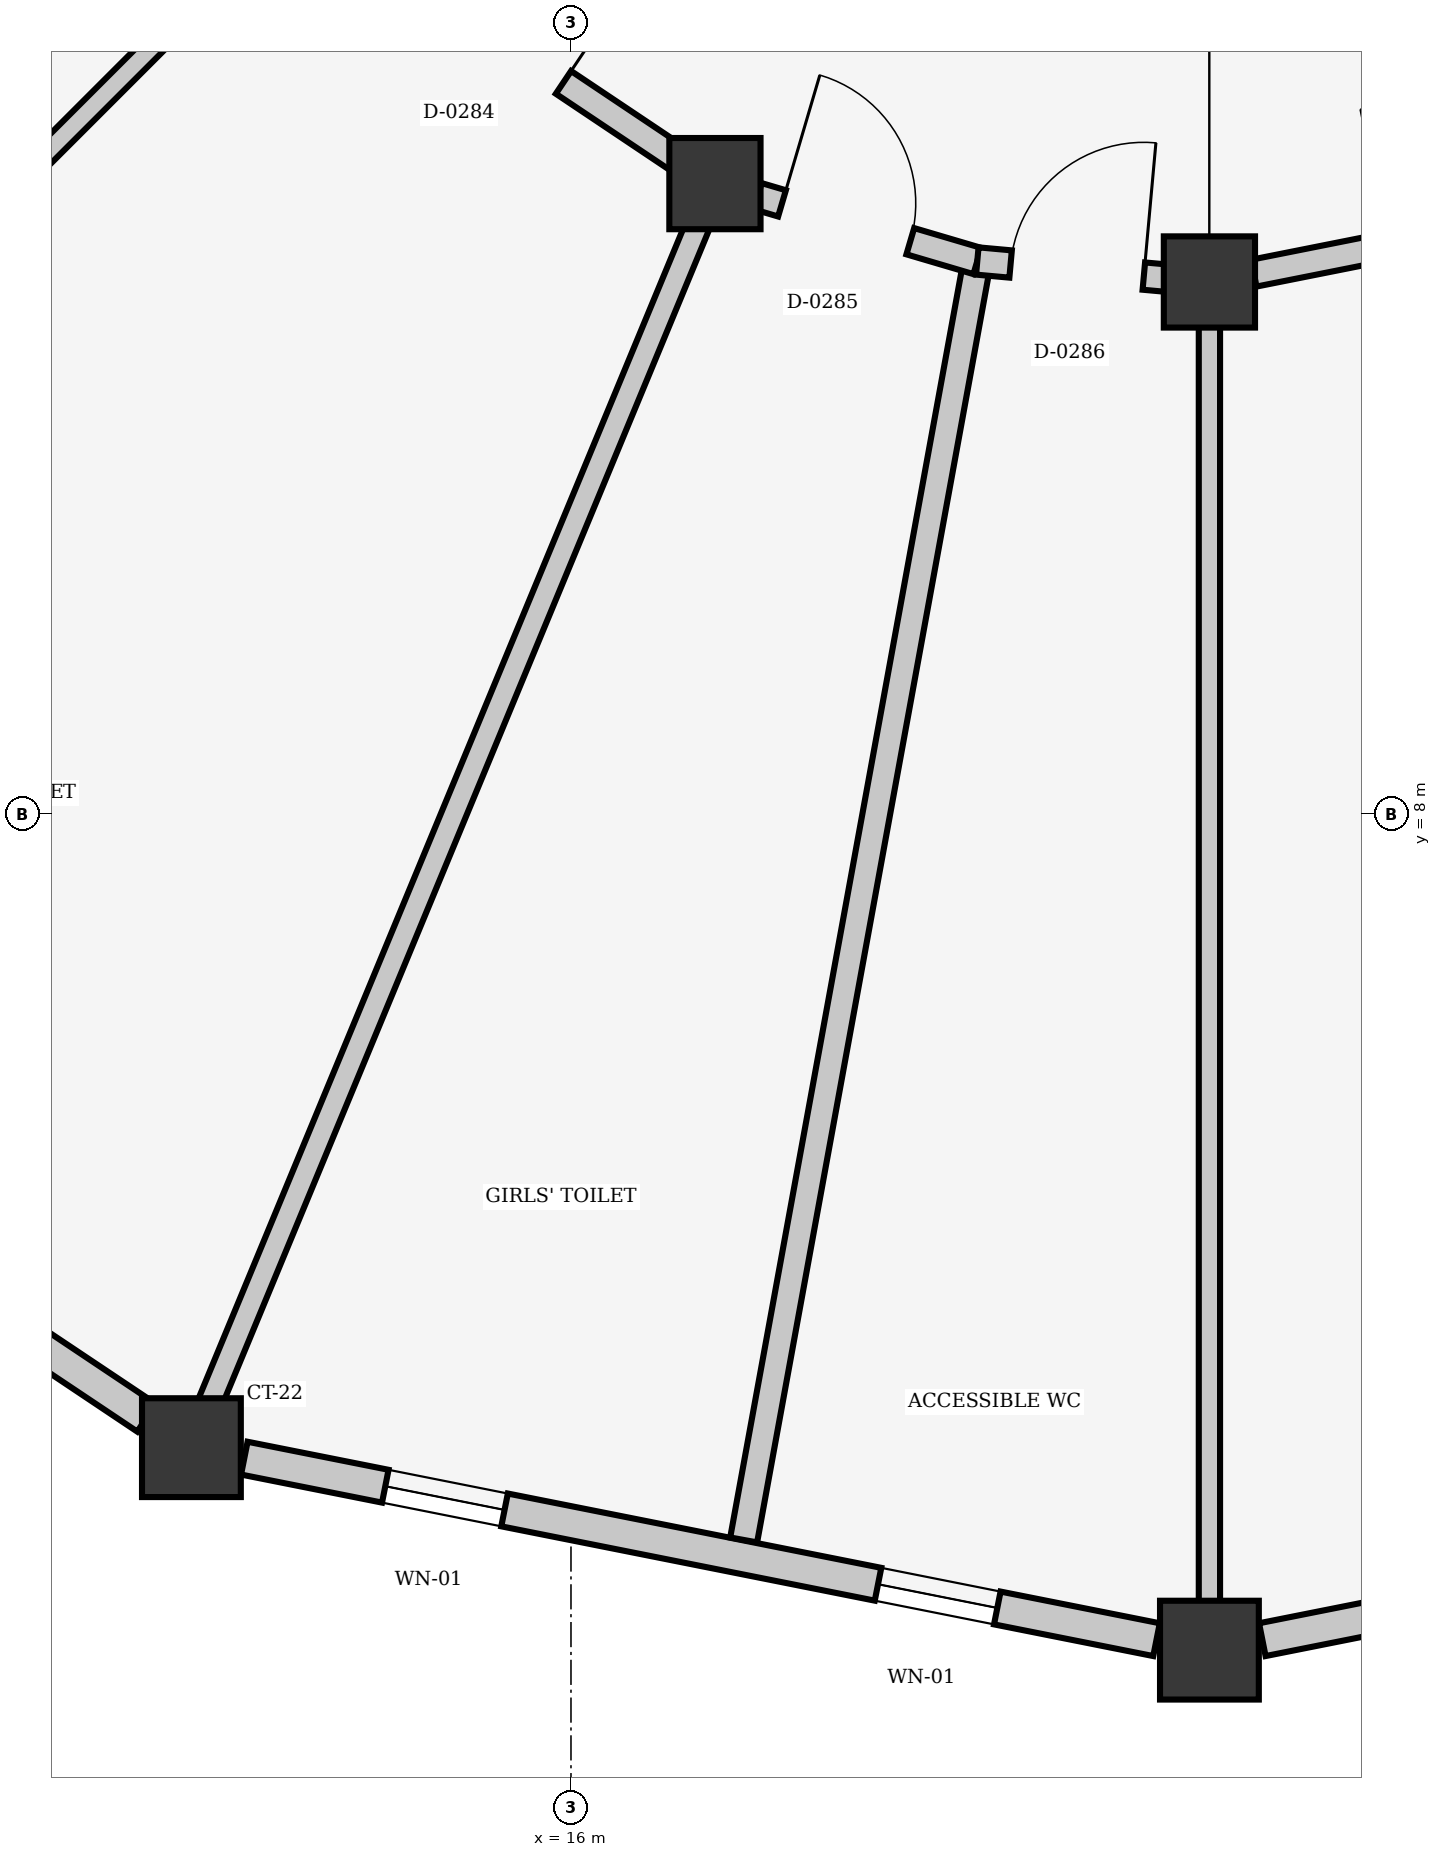
"""IFC4 building model, lengths in metres.
Left out: names, types, materials, properties, quantities, classifications, styles, units other than length and angle.
Written with IfcOpenShell. Run it as: python <this file> out.ifc"""

import sys

from ifc_helpers import new_model, si_unit, direction, frame, frame_2d, origin, origin_2d, place, context, subcontext, project, spatial, rectangle, extrude, element, fill, save


model = new_model("IFC4")
c1 = context("Model", 3, precision=1e-05, world=origin(), true_north=direction((0.0, 1.0)))
c2 = subcontext(c1, "Body", "Model", "MODEL_VIEW")
j1 = project(units=[si_unit("LENGTHUNIT", "METRE"), si_unit("PLANEANGLEUNIT", "RADIAN")], contexts=[c1])
p1 = place(None, origin())
s1 = spatial("IfcSite", under=j1, at=p1, CompositionType="ELEMENT")
p2 = place(p1, origin())
s2 = spatial("IfcBuilding", under=s1, at=p2, CompositionType="ELEMENT")
p3 = place(p2, origin())
s3 = spatial("IfcBuildingStorey", under=s2, at=p3, CompositionType="ELEMENT", Elevation=0.0)
for number, where, z_axis, x_axis in (
    (1, (16.947, 12.147, 0.0), (0.0, 0.0, 1.0), (-0.383, -0.924, 0.0)),
    (2, (20.2, 11.5, 0.0), (0.0, 0.0, 1.0), (0.0, -1.0, 0.0)),
):
    element("IfcColumn", number, at=place(p3, frame(where, z_axis=z_axis, x_axis=x_axis)), inside=s3, PredefinedType="COLUMN", context=c2, shape_type="SweptSolid", body=[
        extrude(rectangle(XDim=0.6, YDim=0.6, at=origin_2d()), origin(), (0.0, 0.0, 1.0), 4.5),
    ])
for number, where, z_axis, x_axis in (
    (3, (13.503, 3.832, 0.0), (0.0, 0.0, 1.0), (-0.383, -0.924, 0.0)),
    (4, (20.2, 2.5, 0.0), (0.0, 0.0, 1.0), (0.0, -1.0, 0.0)),
):
    element("IfcColumn", number, at=place(p3, frame(where, z_axis=z_axis, x_axis=x_axis)), inside=s3, PredefinedType="COLUMN", context=c2, shape_type="SweptSolid", body=[
        extrude(rectangle(XDim=0.65, YDim=0.65, at=origin_2d()), origin(), (0.0, 0.0, 1.0), 4.5),
    ])
p4 = place(p3, frame((13.208, 4.029, 0.0), z_axis=(0.0, 0.0, 1.0), x_axis=(-0.83139901156, 0.555675879967, 0.0)))
e5 = element("IfcWall", 5, at=p4, inside=s3, PredefinedType="SOLIDWALL", context=c2, shape_type="SweptSolid", body=[
    extrude(rectangle(XDim=6.118, YDim=0.22, at=frame_2d((3.059, 0.0))), origin(), (0.0, 0.0, 1.0), 3.55),
])
p5 = place(p4, frame((0.896, 0.0, 0.85)))
e6 = element("IfcOpeningElement", 6, at=p5, cuts=e5, PredefinedType="OPENING", context=c2, shape_type="SweptSolid", body=[
    extrude(rectangle(XDim=0.9, YDim=1.4, at=frame_2d((0.45, 0.7))), frame((0.0, 0.12, 0.0), z_axis=(0.0, -1.0, 0.0), x_axis=(1.0, 0.0, 0.0)), (0.0, 0.0, 1.0), 0.24),
])
p6 = place(p4, frame((2.609, 0.0, 0.85)))
e7 = element("IfcOpeningElement", 7, at=p6, cuts=e5, PredefinedType="OPENING", context=c2, shape_type="SweptSolid", body=[
    extrude(rectangle(XDim=0.9, YDim=1.4, at=frame_2d((0.45, 0.7))), frame((0.0, 0.12, 0.0), z_axis=(0.0, -1.0, 0.0), x_axis=(1.0, 0.0, 0.0)), (0.0, 0.0, 1.0), 0.24),
])
p7 = place(p4, frame((4.323, 0.0, 0.85)))
e8 = element("IfcOpeningElement", 8, at=p7, cuts=e5, PredefinedType="OPENING", context=c2, shape_type="SweptSolid", body=[
    extrude(rectangle(XDim=0.9, YDim=1.4, at=frame_2d((0.45, 0.7))), frame((0.0, 0.12, 0.0), z_axis=(0.0, -1.0, 0.0), x_axis=(1.0, 0.0, 0.0)), (0.0, 0.0, 1.0), 0.24),
])
p8 = place(p3, frame((19.852, 2.569, 0.0), z_axis=(0.0, 0.0, 1.0), x_axis=(-0.98077967596, 0.19511849534, 0.0)))
e9 = element("IfcWall", 9, at=p8, inside=s3, PredefinedType="SOLIDWALL", context=c2, shape_type="SweptSolid", body=[
    extrude(rectangle(XDim=6.119, YDim=0.22, at=frame_2d((3.059, 0.0))), origin(), (0.0, 0.0, 1.0), 3.55),
])
p9 = place(p8, frame((1.068, 0.0, 1.15)))
e10 = element("IfcOpeningElement", 10, at=p9, cuts=e9, PredefinedType="OPENING", context=c2, shape_type="SweptSolid", body=[
    extrude(rectangle(XDim=0.8, YDim=1.1, at=frame_2d((0.4, 0.55))), frame((0.0, 0.12, 0.0), z_axis=(0.0, -1.0, 0.0), x_axis=(1.0, 0.0, 0.0)), (0.0, 0.0, 1.0), 0.24),
])
p10 = place(p8, frame((4.373, 0.0, 1.15)))
e11 = element("IfcOpeningElement", 11, at=p10, cuts=e9, PredefinedType="OPENING", context=c2, shape_type="SweptSolid", body=[
    extrude(rectangle(XDim=0.8, YDim=1.1, at=frame_2d((0.4, 0.55))), frame((0.0, 0.12, 0.0), z_axis=(0.0, -1.0, 0.0), x_axis=(1.0, 0.0, 0.0)), (0.0, 0.0, 1.0), 0.24),
])
p11 = place(p3, frame((26.549, 3.763, 0.0), z_axis=(0.0, 0.0, 1.0), x_axis=(-0.98077967596, -0.19511849534, 0.0)))
e12 = element("IfcWall", 12, at=p11, inside=s3, PredefinedType="SOLIDWALL", context=c2, shape_type="SweptSolid", body=[
    extrude(rectangle(XDim=6.119, YDim=0.22, at=frame_2d((3.059, 0.0))), origin(), (0.0, 0.0, 1.0), 3.55),
])
p12 = place(p11, frame((0.896, 0.0, 0.85)))
e13 = element("IfcOpeningElement", 13, at=p12, cuts=e12, PredefinedType="OPENING", context=c2, shape_type="SweptSolid", body=[
    extrude(rectangle(XDim=0.9, YDim=1.4, at=frame_2d((0.45, 0.7))), frame((0.0, 0.12, 0.0), z_axis=(0.0, -1.0, 0.0), x_axis=(1.0, 0.0, 0.0)), (0.0, 0.0, 1.0), 0.24),
])
p13 = place(p11, frame((2.609, 0.0, 0.85)))
e14 = element("IfcOpeningElement", 14, at=p13, cuts=e12, PredefinedType="OPENING", context=c2, shape_type="SweptSolid", body=[
    extrude(rectangle(XDim=0.9, YDim=1.4, at=frame_2d((0.45, 0.7))), frame((0.0, 0.12, 0.0), z_axis=(0.0, -1.0, 0.0), x_axis=(1.0, 0.0, 0.0)), (0.0, 0.0, 1.0), 0.24),
])
p14 = place(p11, frame((4.323, 0.0, 0.85)))
e15 = element("IfcOpeningElement", 15, at=p14, cuts=e12, PredefinedType="OPENING", context=c2, shape_type="SweptSolid", body=[
    extrude(rectangle(XDim=0.9, YDim=1.4, at=frame_2d((0.45, 0.7))), frame((0.0, 0.12, 0.0), z_axis=(0.0, -1.0, 0.0), x_axis=(1.0, 0.0, 0.0)), (0.0, 0.0, 1.0), 0.24),
])
p15 = place(p3, frame((13.984, 13.784, 0.0), z_axis=(0.0, 0.0, 1.0), x_axis=(-0.707106781187, -0.707106781187, 0.0)))
e16 = element("IfcWall", 16, at=p15, inside=s3, PredefinedType="PARTITIONING", context=c2, shape_type="SweptSolid", body=[
    extrude(rectangle(XDim=8.392, YDim=0.14, at=frame_2d((4.196, 0.0))), origin(), (0.0, 0.0, 1.0), 3.552),
])
p16 = place(p3, frame((16.836, 11.877, 0.0), z_axis=(0.0, 0.0, 1.0), x_axis=(-0.382780060664, -0.923839501839, 0.0)))
e17 = element("IfcWall", 17, at=p16, inside=s3, PredefinedType="PARTITIONING", context=c2, shape_type="SweptSolid", body=[
    extrude(rectangle(XDim=8.391, YDim=0.16, at=frame_2d((4.196, 0.0))), origin(), (0.0, 0.0, 1.0), 3.552),
])
p17 = place(p3, frame((20.2, 11.208, 0.0), z_axis=(0.0, 0.0, 1.0), x_axis=(0.0, -1.0, 0.0)))
e18 = element("IfcWall", 18, at=p17, inside=s3, PredefinedType="PARTITIONING", context=c2, shape_type="SweptSolid", body=[
    extrude(rectangle(XDim=8.391, YDim=0.14, at=frame_2d((4.196, 0.0))), origin(), (0.0, 0.0, 1.0), 3.552),
])
p18 = place(p3, frame((18.673, 11.638, 0.0), z_axis=(0.0, 0.0, 1.0), x_axis=(-0.179734485707, -0.983715159306, 0.0)))
e19 = element("IfcWall", 19, at=p18, inside=s3, PredefinedType="PARTITIONING", context=c2, shape_type="SweptSolid", body=[
    extrude(rectangle(XDim=8.552, YDim=0.18, at=frame_2d((4.276, 0.0))), origin(), (0.0, 0.0, 1.0), 3.552),
])
p19 = place(p3, frame((14.438, 13.825, 0.0), z_axis=(0.0, 0.0, 1.0), x_axis=(0.831096426298, -0.556128339679, 0.0)))
e20 = element("IfcWall", 20, at=p19, inside=s3, PredefinedType="PARTITIONING", context=c2, shape_type="SweptSolid", body=[
    extrude(rectangle(XDim=2.72, YDim=0.18, at=frame_2d((1.36, 0.0))), origin(), (0.0, 0.0, 1.0), 3.552),
])
p20 = place(p19, frame((0.9, 0.0, 0.0)))
e21 = element("IfcOpeningElement", 21, at=p20, cuts=e20, PredefinedType="OPENING", context=c2, shape_type="SweptSolid", body=[
    extrude(rectangle(XDim=0.92, YDim=2.1, at=frame_2d((0.46, 1.05))), frame((0.0, 0.1, 0.0), z_axis=(0.0, -1.0, 0.0), x_axis=(1.0, 0.0, 0.0)), (0.0, 0.0, 1.0), 0.2),
])
p21 = place(p3, frame((17.229, 12.064, 0.0), z_axis=(0.0, 0.0, 1.0), x_axis=(0.959132791877, -0.282956335051, 0.0)))
e22 = element("IfcWall", 22, at=p21, inside=s3, PredefinedType="PARTITIONING", context=c2, shape_type="SweptSolid", body=[
    extrude(rectangle(XDim=1.506, YDim=0.18, at=frame_2d((0.753, 0.0))), origin(), (0.0, 0.0, 1.0), 3.552),
])
p22 = place(p21, frame((0.166, 0.0, 0.0)))
e23 = element("IfcOpeningElement", 23, at=p22, cuts=e22, PredefinedType="OPENING", context=c2, shape_type="SweptSolid", body=[
    extrude(rectangle(XDim=0.88, YDim=2.1, at=frame_2d((0.44, 1.05))), frame((0.0, 0.1, 0.0), z_axis=(0.0, -1.0, 0.0), x_axis=(1.0, 0.0, 0.0)), (0.0, 0.0, 1.0), 0.2),
])
p23 = place(p3, frame((18.673, 11.638, 0.0), z_axis=(0.0, 0.0, 1.0), x_axis=(0.995907718878, -0.090375967372, 0.0)))
e24 = element("IfcWall", 24, at=p23, inside=s3, PredefinedType="PARTITIONING", context=c2, shape_type="SweptSolid", body=[
    extrude(rectangle(XDim=1.24, YDim=0.18, at=frame_2d((0.62, 0.0))), origin(), (0.0, 0.0, 1.0), 3.552),
])
p24 = place(p23, frame((0.22, 0.0, 0.0)))
e25 = element("IfcOpeningElement", 25, at=p24, cuts=e24, PredefinedType="OPENING", context=c2, shape_type="SweptSolid", body=[
    extrude(rectangle(XDim=0.88, YDim=2.1, at=frame_2d((0.44, 1.05))), frame((0.0, 0.1, 0.0), z_axis=(0.0, -1.0, 0.0), x_axis=(1.0, 0.0, 0.0)), (0.0, 0.0, 1.0), 0.2),
])
p25 = place(p3, frame((20.492, 11.558, 0.0), z_axis=(0.0, 0.0, 1.0), x_axis=(0.980776867939, 0.195132609565, 0.0)))
e26 = element("IfcWall", 26, at=p25, inside=s3, PredefinedType="PARTITIONING", context=c2, shape_type="SweptSolid", body=[
    extrude(rectangle(XDim=2.721, YDim=0.18, at=frame_2d((1.361, 0.0))), origin(), (0.0, 0.0, 1.0), 3.552),
])
p26 = place(p25, frame((0.901, 0.0, 0.0)))
e27 = element("IfcOpeningElement", 27, at=p26, cuts=e26, PredefinedType="OPENING", context=c2, shape_type="SweptSolid", body=[
    extrude(rectangle(XDim=0.92, YDim=2.1, at=frame_2d((0.46, 1.05))), frame((0.0, 0.1, 0.0), z_axis=(0.0, -1.0, 0.0), x_axis=(1.0, 0.0, 0.0)), (0.0, 0.0, 1.0), 0.2),
])
p27 = place(p9, origin())
e28 = element("IfcWindow", 28, at=p27, inside=s3, PartitioningType="SINGLE_PANEL", PredefinedType="WINDOW", context=c2, shape_type="SweptSolid", body=[
    extrude(rectangle(XDim=0.8, YDim=1.1, at=frame_2d((0.4, 0.55))), frame((0.0, 0.03, 0.0), z_axis=(0.0, -1.0, 0.0), x_axis=(1.0, 0.0, 0.0)), (0.0, 0.0, 1.0), 0.06),
])
fill(e10, e28)
p28 = place(p10, origin())
e29 = element("IfcWindow", 29, at=p28, inside=s3, PartitioningType="SINGLE_PANEL", PredefinedType="WINDOW", context=c2, shape_type="SweptSolid", body=[
    extrude(rectangle(XDim=0.8, YDim=1.1, at=frame_2d((0.4, 0.55))), frame((0.0, 0.03, 0.0), z_axis=(0.0, -1.0, 0.0), x_axis=(1.0, 0.0, 0.0)), (0.0, 0.0, 1.0), 0.06),
])
fill(e11, e29)
p29 = place(p20, origin())
e30 = element("IfcDoor", 30, at=p29, inside=s3, OperationType="SINGLE_SWING_RIGHT", PredefinedType="DOOR", context=c2, shape_type="SweptSolid", body=[
    extrude(rectangle(XDim=0.92, YDim=2.1, at=frame_2d((0.46, 1.05))), frame((0.0, 0.025, 0.0), z_axis=(0.0, -1.0, 0.0), x_axis=(1.0, 0.0, 0.0)), (0.0, 0.0, 1.0), 0.05),
])
fill(e21, e30)
p30 = place(p22, origin())
e31 = element("IfcDoor", 31, at=p30, inside=s3, OperationType="SINGLE_SWING_LEFT", PredefinedType="DOOR", context=c2, shape_type="SweptSolid", body=[
    extrude(rectangle(XDim=0.88, YDim=2.1, at=frame_2d((0.44, 1.05))), frame((0.0, 0.025, 0.0), z_axis=(0.0, -1.0, 0.0), x_axis=(1.0, 0.0, 0.0)), (0.0, 0.0, 1.0), 0.05),
])
fill(e23, e31)
p31 = place(p24, origin())
e32 = element("IfcDoor", 32, at=p31, inside=s3, OperationType="SINGLE_SWING_RIGHT", PredefinedType="DOOR", context=c2, shape_type="SweptSolid", body=[
    extrude(rectangle(XDim=0.88, YDim=2.1, at=frame_2d((0.44, 1.05))), frame((0.0, 0.025, 0.0), z_axis=(0.0, -1.0, 0.0), x_axis=(1.0, 0.0, 0.0)), (0.0, 0.0, 1.0), 0.05),
])
fill(e25, e32)
save(model, sys.argv[1])
